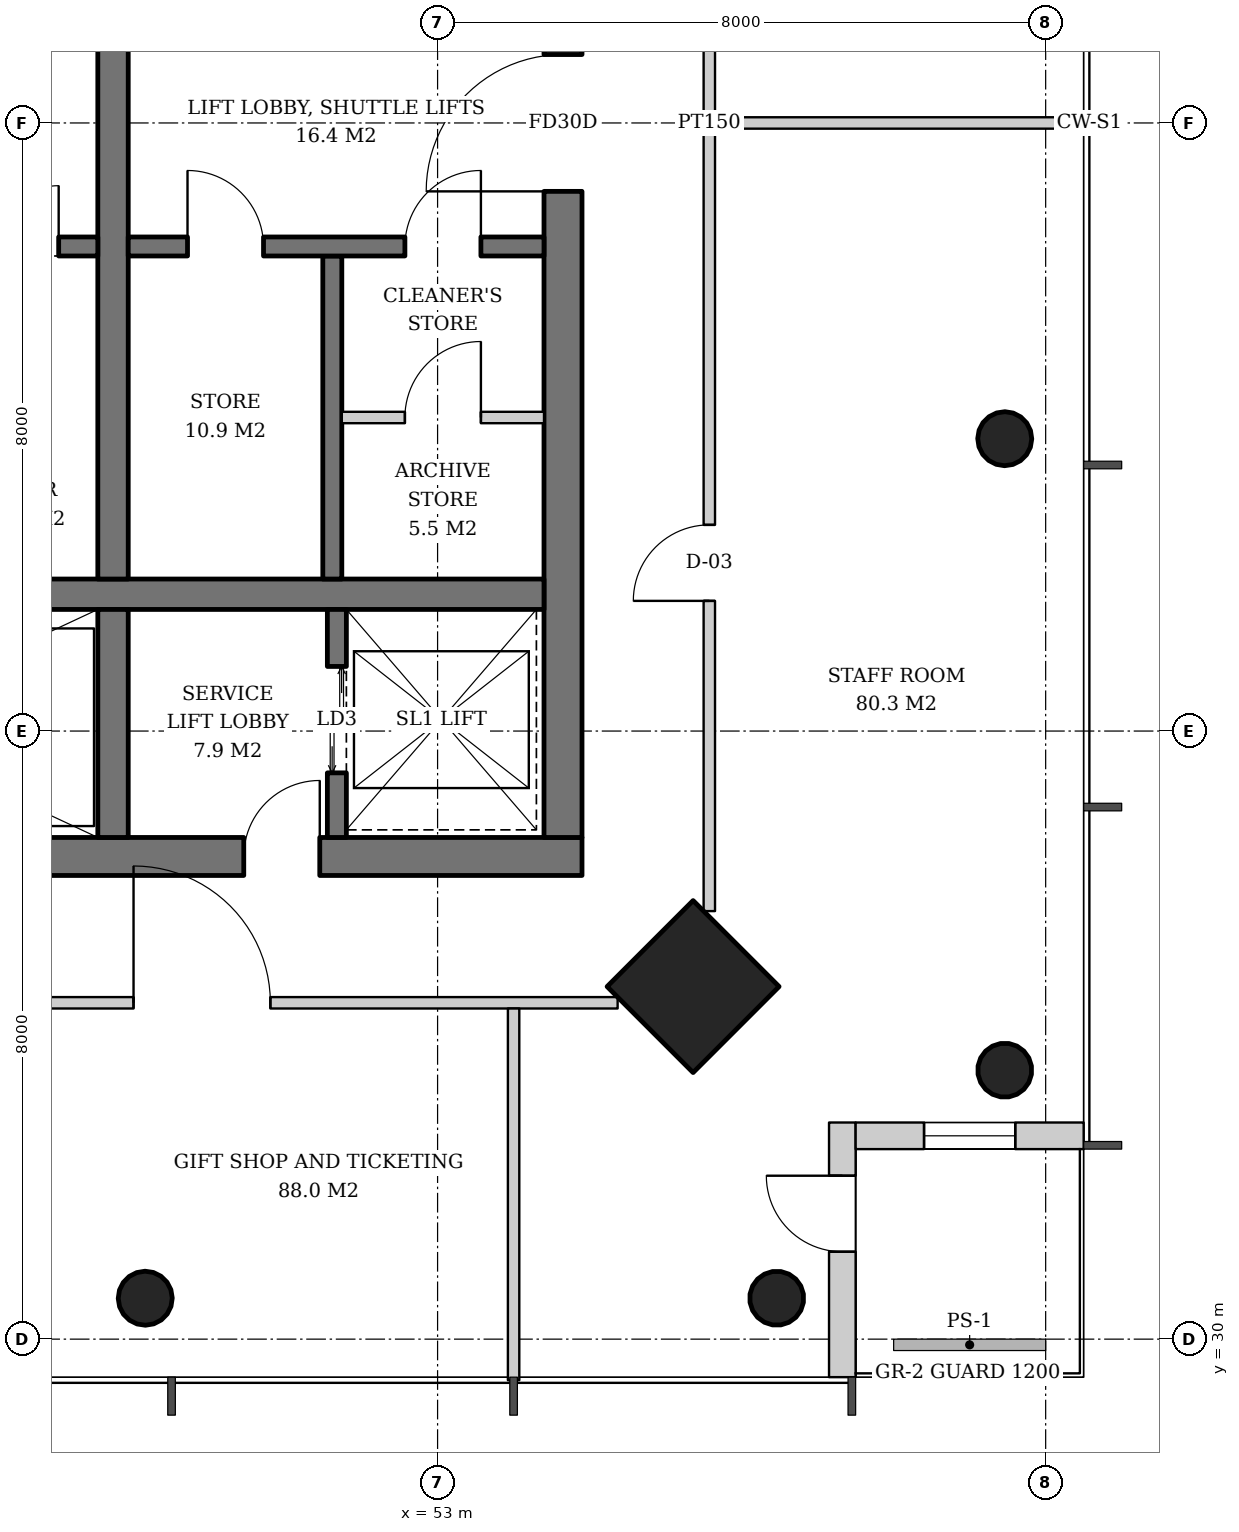
"""IFC4 building model, lengths in metres.
Left out: names, types, materials, properties, quantities, classifications, styles, units other than length and angle.
Written with IfcOpenShell. Run it as: python <this file> out.ifc"""

import sys

from ifc_helpers import new_model, si_unit, direction, frame, frame_2d, origin, origin_2d, place, context, subcontext, project, spatial, rectangle, hollow_circle, extrude, element, fill, save


model = new_model("IFC4")
c1 = context("Model", 3, precision=1e-05, world=origin(), true_north=direction((0.0, 1.0)))
c2 = subcontext(c1, "Body", "Model", "MODEL_VIEW")
j1 = project(units=[si_unit("LENGTHUNIT", "METRE"), si_unit("PLANEANGLEUNIT", "RADIAN")], contexts=[c1])
p1 = place(None, origin())
s1 = spatial("IfcSite", under=j1, at=p1, CompositionType="ELEMENT")
p2 = place(p1, origin())
s2 = spatial("IfcBuilding", under=s1, at=p2, CompositionType="ELEMENT")
p3 = place(p2, frame((0.0, 0.0, 287.0)))
s3 = spatial("IfcBuildingStorey", under=s2, at=p3, CompositionType="ELEMENT", Elevation=287.0)
p4 = place(p3, frame((60.5, 33.5, 0.0), z_axis=(-0.031898107953, 0.031898107953, 0.998981992539), x_axis=(-0.707106781187, -0.707106781187, 0.0)))
e1 = element("IfcColumn", 1, at=p4, inside=s3, PredefinedType="COLUMN", context=c2, shape_type="SweptSolid", body=[
    extrude(hollow_circle(Radius=0.355, WallThickness=0.025, at=origin_2d()), origin(), (0.0, 0.0, 1.0), 3.804),
])
p5 = place(p3, frame((60.5, 41.833, 0.0), z_axis=(-0.031912535354, 0.010658915229, 0.999433828532), x_axis=(-0.316800238982, -0.948492281772, 0.0)))
e2 = element("IfcColumn", 2, at=p5, inside=s3, PredefinedType="COLUMN", context=c2, shape_type="SweptSolid", body=[
    extrude(hollow_circle(Radius=0.355, WallThickness=0.025, at=origin_2d()), origin(), (0.0, 0.0, 1.0), 3.802),
])
p6 = place(p3, frame((56.4, 34.6, 0.0), z_axis=(-0.031898107953, 0.031898107953, 0.998981992539), x_axis=(-0.707106781187, -0.707106781187, 0.0)))
e3 = element("IfcColumn", 3, at=p6, inside=s3, PredefinedType="COLUMN", context=c2, shape_type="SweptSolid", body=[
    extrude(rectangle(XDim=1.6, YDim=1.6, at=origin_2d()), origin(), (0.0, 0.0, 1.0), 3.804),
])
p7 = place(p3, frame((57.5, 30.5, 0.0), z_axis=(-0.031898107953, 0.031898107953, 0.998981992539), x_axis=(-0.707106781187, -0.707106781187, 0.0)))
e4 = element("IfcColumn", 4, at=p7, inside=s3, PredefinedType="COLUMN", context=c2, shape_type="SweptSolid", body=[
    extrude(hollow_circle(Radius=0.355, WallThickness=0.025, at=origin_2d()), origin(), (0.0, 0.0, 1.0), 3.804),
])
p8 = place(p3, frame((49.167, 30.5, 0.0), z_axis=(-0.010658915229, 0.031912535354, 0.999433828532), x_axis=(-0.948492281772, -0.316800238982, 0.0)))
e5 = element("IfcColumn", 5, at=p8, inside=s3, PredefinedType="COLUMN", context=c2, shape_type="SweptSolid", body=[
    extrude(hollow_circle(Radius=0.355, WallThickness=0.025, at=origin_2d()), origin(), (0.0, 0.0, 1.0), 3.802),
])
p9 = place(p3, frame((35.1, 36.35, 0.0), z_axis=(0.0, 0.0, 1.0), x_axis=(1.0, 0.0, 0.0)))
e6 = element("IfcWall", 6, at=p9, inside=s3, PredefinedType="SHEAR", context=c2, shape_type="SweptSolid", body=[
    extrude(rectangle(XDim=19.8, YDim=0.5, at=frame_2d((9.9, 0.0))), origin(), (0.0, 0.0, 1.0), 3.8),
])
p10 = place(p9, frame((3.9, 0.0, 0.0)))
e7 = element("IfcOpeningElement", 7, at=p10, cuts=e6, PredefinedType="OPENING", context=c2, shape_type="SweptSolid", body=[
    extrude(rectangle(XDim=1.0, YDim=2.1, at=frame_2d((0.5, 1.05))), frame((0.0, 0.26, 0.0), z_axis=(0.0, -1.0, 0.0), x_axis=(1.0, 0.0, 0.0)), (0.0, 0.0, 1.0), 0.52),
])
p11 = place(p9, frame((15.35, 0.0, 0.0)))
e8 = element("IfcOpeningElement", 8, at=p11, cuts=e6, PredefinedType="OPENING", context=c2, shape_type="SweptSolid", body=[
    extrude(rectangle(XDim=1.0, YDim=2.1, at=frame_2d((0.5, 1.05))), frame((0.0, 0.26, 0.0), z_axis=(0.0, -1.0, 0.0), x_axis=(1.0, 0.0, 0.0)), (0.0, 0.0, 1.0), 0.52),
])
p12 = place(p3, frame((54.65, 36.6, 0.0), z_axis=(0.0, 0.0, 1.0), x_axis=(0.0, 1.0, 0.0)))
e9 = element("IfcWall", 9, at=p12, inside=s3, PredefinedType="SHEAR", context=c2, shape_type="SweptSolid", body=[
    extrude(rectangle(XDim=18.8, YDim=0.5, at=frame_2d((9.4, 0.0))), origin(), (0.0, 0.0, 1.0), 3.8),
])
p13 = place(p12, frame((8.5, 0.0, 0.0)))
e10 = element("IfcOpeningElement", 10, at=p13, cuts=e9, PredefinedType="OPENING", context=c2, shape_type="SweptSolid", body=[
    extrude(rectangle(XDim=1.8, YDim=2.4, at=frame_2d((0.9, 1.2))), frame((0.0, 0.26, 0.0), z_axis=(0.0, -1.0, 0.0), x_axis=(1.0, 0.0, 0.0)), (0.0, 0.0, 1.0), 0.52),
])
p14 = place(p3, frame((35.6, 39.8, 0.0), z_axis=(0.0, 0.0, 1.0), x_axis=(1.0, 0.0, 0.0)))
e11 = element("IfcWall", 11, at=p14, inside=s3, PredefinedType="SHEAR", context=c2, shape_type="SweptSolid", body=[
    extrude(rectangle(XDim=18.8, YDim=0.4, at=frame_2d((9.4, 0.0))), origin(), (0.0, 0.0, 1.0), 3.8),
])
p15 = place(p3, frame((48.73, 36.6, 0.0), z_axis=(0.0, 0.0, 1.0), x_axis=(0.0, 1.0, 0.0)))
e12 = element("IfcWall", 12, at=p15, inside=s3, PredefinedType="SHEAR", context=c2, shape_type="SweptSolid", body=[
    extrude(rectangle(XDim=3.0, YDim=0.4, at=frame_2d((1.5, 0.0))), origin(), (0.0, 0.0, 1.0), 3.8),
])
p16 = place(p3, frame((48.73, 40.0, 0.0), z_axis=(0.0, 0.0, 1.0), x_axis=(0.0, 1.0, 0.0)))
e13 = element("IfcWall", 13, at=p16, inside=s3, PredefinedType="SHEAR", context=c2, shape_type="SweptSolid", body=[
    extrude(rectangle(XDim=12.0, YDim=0.4, at=frame_2d((6.0, 0.0))), origin(), (0.0, 0.0, 1.0), 3.8),
])
p17 = place(p3, frame((58.325, 29.5, 0.0), z_axis=(0.0, 0.0, 1.0), x_axis=(0.0, 1.0, 0.0)))
e14 = element("IfcWall", 14, at=p17, inside=s3, PredefinedType="SOLIDWALL", context=c2, shape_type="SweptSolid", body=[
    extrude(rectangle(XDim=3.35, YDim=0.35, at=frame_2d((1.675, 0.0))), origin(), (0.0, 0.0, 1.0), 3.55),
])
p18 = place(p17, frame((1.65, 0.0, 0.0)))
e15 = element("IfcOpeningElement", 15, at=p18, cuts=e14, PredefinedType="OPENING", context=c2, shape_type="SweptSolid", body=[
    extrude(rectangle(XDim=1.0, YDim=2.4, at=frame_2d((0.5, 1.2))), frame((0.0, 0.185, 0.0), z_axis=(0.0, -1.0, 0.0), x_axis=(1.0, 0.0, 0.0)), (0.0, 0.0, 1.0), 0.37),
])
p19 = place(p3, frame((58.5, 32.675, 0.0), z_axis=(0.0, 0.0, 1.0), x_axis=(1.0, 0.0, 0.0)))
e16 = element("IfcWall", 16, at=p19, inside=s3, PredefinedType="SOLIDWALL", context=c2, shape_type="SweptSolid", body=[
    extrude(rectangle(XDim=3.0, YDim=0.35, at=frame_2d((1.5, 0.0))), origin(), (0.0, 0.0, 1.0), 3.55),
])
p20 = place(p19, frame((0.9, 0.0, 0.6)))
e17 = element("IfcOpeningElement", 17, at=p20, cuts=e16, PredefinedType="OPENING", context=c2, shape_type="SweptSolid", body=[
    extrude(rectangle(XDim=1.2, YDim=2.55, at=frame_2d((0.6, 1.275))), frame((0.0, 0.185, 0.0), z_axis=(0.0, -1.0, 0.0), x_axis=(1.0, 0.0, 0.0)), (0.0, 0.0, 1.0), 0.37),
])
p21 = place(p3, frame((51.675, 36.6, 0.0), z_axis=(0.0, 0.0, 1.0), x_axis=(0.0, 1.0, 0.0)))
e18 = element("IfcWall", 18, at=p21, inside=s3, PredefinedType="SHEAR", context=c2, shape_type="SweptSolid", body=[
    extrude(rectangle(XDim=3.0, YDim=0.25, at=frame_2d((1.5, 0.0))), origin(), (0.0, 0.0, 1.0), 3.8),
])
p22 = place(p21, frame((0.85, 0.0, 0.0)))
e19 = element("IfcOpeningElement", 19, at=p22, cuts=e18, PredefinedType="OPENING", context=c2, shape_type="SweptSolid", body=[
    extrude(rectangle(XDim=1.4, YDim=2.4, at=frame_2d((0.7, 1.2))), frame((0.0, 0.135, 0.0), z_axis=(0.0, -1.0, 0.0), x_axis=(1.0, 0.0, 0.0)), (0.0, 0.0, 1.0), 0.27),
])
p23 = place(p3, frame((35.6, 44.375, 0.0), z_axis=(0.0, 0.0, 1.0), x_axis=(1.0, 0.0, 0.0)))
e20 = element("IfcWall", 20, at=p23, inside=s3, PredefinedType="SHEAR", context=c2, shape_type="SweptSolid", body=[
    extrude(rectangle(XDim=12.93, YDim=0.25, at=frame_2d((6.465, 0.0))), origin(), (0.0, 0.0, 1.0), 3.8),
])
p24 = place(p23, frame((0.75, 0.0, 0.0)))
e21 = element("IfcOpeningElement", 21, at=p24, cuts=e20, PredefinedType="OPENING", context=c2, shape_type="SweptSolid", body=[
    extrude(rectangle(XDim=1.1, YDim=2.2, at=frame_2d((0.55, 1.1))), frame((0.0, 0.135, 0.0), z_axis=(0.0, -1.0, 0.0), x_axis=(1.0, 0.0, 0.0)), (0.0, 0.0, 1.0), 0.27),
])
p25 = place(p23, frame((3.55, 0.0, 0.0)))
e22 = element("IfcOpeningElement", 22, at=p25, cuts=e20, PredefinedType="OPENING", context=c2, shape_type="SweptSolid", body=[
    extrude(rectangle(XDim=1.1, YDim=2.2, at=frame_2d((0.55, 1.1))), frame((0.0, 0.135, 0.0), z_axis=(0.0, -1.0, 0.0), x_axis=(1.0, 0.0, 0.0)), (0.0, 0.0, 1.0), 0.27),
])
p26 = place(p23, frame((6.3, 0.0, 0.0)))
e23 = element("IfcOpeningElement", 23, at=p26, cuts=e20, PredefinedType="OPENING", context=c2, shape_type="SweptSolid", body=[
    extrude(rectangle(XDim=1.1, YDim=2.2, at=frame_2d((0.55, 1.1))), frame((0.0, 0.135, 0.0), z_axis=(0.0, -1.0, 0.0), x_axis=(1.0, 0.0, 0.0)), (0.0, 0.0, 1.0), 0.27),
])
p27 = place(p23, frame((9.1, 0.0, 0.0)))
e24 = element("IfcOpeningElement", 24, at=p27, cuts=e20, PredefinedType="OPENING", context=c2, shape_type="SweptSolid", body=[
    extrude(rectangle(XDim=1.0, YDim=2.1, at=frame_2d((0.5, 1.05))), frame((0.0, 0.135, 0.0), z_axis=(0.0, -1.0, 0.0), x_axis=(1.0, 0.0, 0.0)), (0.0, 0.0, 1.0), 0.27),
])
p28 = place(p23, frame((11.615, 0.0, 0.0)))
e25 = element("IfcOpeningElement", 25, at=p28, cuts=e20, PredefinedType="OPENING", context=c2, shape_type="SweptSolid", body=[
    extrude(rectangle(XDim=0.8, YDim=2.0, at=frame_2d((0.4, 1.0))), frame((0.0, 0.135, 0.0), z_axis=(0.0, -1.0, 0.0), x_axis=(1.0, 0.0, 0.0)), (0.0, 0.0, 1.0), 0.27),
])
p29 = place(p3, frame((51.615, 44.25, 0.0), z_axis=(0.0, 0.0, 1.0), x_axis=(0.0, -1.0, 0.0)))
e26 = element("IfcWall", 26, at=p29, inside=s3, PredefinedType="SHEAR", context=c2, shape_type="SweptSolid", body=[
    extrude(rectangle(XDim=4.25, YDim=0.25, at=frame_2d((2.125, 0.0))), origin(), (0.0, 0.0, 1.0), 3.8),
])
p30 = place(p3, frame((48.93, 44.375, 0.0), z_axis=(0.0, 0.0, 1.0), x_axis=(1.0, 0.0, 0.0)))
e27 = element("IfcWall", 27, at=p30, inside=s3, PredefinedType="SHEAR", context=c2, shape_type="SweptSolid", body=[
    extrude(rectangle(XDim=5.47, YDim=0.25, at=frame_2d((2.735, 0.0))), origin(), (0.0, 0.0, 1.0), 3.8),
])
p31 = place(p30, frame((0.78, 0.0, 0.0)))
e28 = element("IfcOpeningElement", 28, at=p31, cuts=e27, PredefinedType="OPENING", context=c2, shape_type="SweptSolid", body=[
    extrude(rectangle(XDim=1.0, YDim=2.1, at=frame_2d((0.5, 1.05))), frame((0.0, 0.135, 0.0), z_axis=(0.0, -1.0, 0.0), x_axis=(1.0, 0.0, 0.0)), (0.0, 0.0, 1.0), 0.27),
])
p32 = place(p30, frame((3.64, 0.0, 0.0)))
e29 = element("IfcOpeningElement", 29, at=p32, cuts=e27, PredefinedType="OPENING", context=c2, shape_type="SweptSolid", body=[
    extrude(rectangle(XDim=1.0, YDim=2.1, at=frame_2d((0.5, 1.05))), frame((0.0, 0.135, 0.0), z_axis=(0.0, -1.0, 0.0), x_axis=(1.0, 0.0, 0.0)), (0.0, 0.0, 1.0), 0.27),
])
p33 = place(p3, frame((51.74, 42.125, 0.0), z_axis=(0.0, 0.0, 1.0), x_axis=(1.0, 0.0, 0.0)))
e30 = element("IfcWall", 30, at=p33, inside=s3, PredefinedType="SOLIDWALL", context=c2, shape_type="SweptSolid", body=[
    extrude(rectangle(XDim=2.66, YDim=0.15, at=frame_2d((1.33, 0.0))), origin(), (0.0, 0.0, 1.0), 3.55),
])
p34 = place(p33, frame((0.83, 0.0, 0.0)))
e31 = element("IfcOpeningElement", 31, at=p34, cuts=e30, PredefinedType="OPENING", context=c2, shape_type="SweptSolid", body=[
    extrude(rectangle(XDim=1.0, YDim=2.1, at=frame_2d((0.5, 1.05))), frame((0.0, 0.085, 0.0), z_axis=(0.0, -1.0, 0.0), x_axis=(1.0, 0.0, 0.0)), (0.0, 0.0, 1.0), 0.17),
])
p35 = place(p3, frame((56.65, 46.0, 0.0), z_axis=(0.0, 0.0, 1.0), x_axis=(1.0, 0.0, 0.0)))
e32 = element("IfcWall", 32, at=p35, inside=s3, PredefinedType="PARTITIONING", context=c2, shape_type="SweptSolid", body=[
    extrude(rectangle(XDim=4.89, YDim=0.15, at=frame_2d((2.445, 0.0))), origin(), (0.0, 0.0, 1.0), 3.05),
])
p36 = place(p3, frame((56.575, 35.631, 0.0), z_axis=(0.0, 0.0, 1.0), x_axis=(0.0, 1.0, 0.0)))
e33 = element("IfcWall", 33, at=p36, inside=s3, PredefinedType="PARTITIONING", context=c2, shape_type="SweptSolid", body=[
    extrude(rectangle(XDim=20.737, YDim=0.15, at=frame_2d((10.369, 0.0))), origin(), (0.0, 0.0, 1.0), 2.95),
])
p37 = place(p36, frame((4.081, 0.0, 0.0)))
e34 = element("IfcOpeningElement", 34, at=p37, cuts=e33, PredefinedType="OPENING", context=c2, shape_type="SweptSolid", body=[
    extrude(rectangle(XDim=1.0, YDim=2.1, at=frame_2d((0.5, 1.05))), frame((0.0, 0.085, 0.0), z_axis=(0.0, -1.0, 0.0), x_axis=(1.0, 0.0, 0.0)), (0.0, 0.0, 1.0), 0.17),
])
p38 = place(p36, frame((14.369, 0.0, 0.0)))
e35 = element("IfcOpeningElement", 35, at=p38, cuts=e33, PredefinedType="OPENING", context=c2, shape_type="SweptSolid", body=[
    extrude(rectangle(XDim=1.0, YDim=2.1, at=frame_2d((0.5, 1.05))), frame((0.0, 0.085, 0.0), z_axis=(0.0, -1.0, 0.0), x_axis=(1.0, 0.0, 0.0)), (0.0, 0.0, 1.0), 0.17),
])
p39 = place(p3, frame((34.631, 34.425, 0.0), z_axis=(0.0, 0.0, 1.0), x_axis=(1.0, 0.0, 0.0)))
e36 = element("IfcWall", 36, at=p39, inside=s3, PredefinedType="PARTITIONING", context=c2, shape_type="SweptSolid", body=[
    extrude(rectangle(XDim=20.737, YDim=0.15, at=frame_2d((10.369, 0.0))), origin(), (0.0, 0.0, 1.0), 2.95),
])
p40 = place(p39, frame((1.169, 0.0, 0.0)))
e37 = element("IfcOpeningElement", 37, at=p40, cuts=e36, PredefinedType="OPENING", context=c2, shape_type="SweptSolid", body=[
    extrude(rectangle(XDim=0.8, YDim=2.1, at=frame_2d((0.4, 1.05))), frame((0.0, 0.085, 0.0), z_axis=(0.0, -1.0, 0.0), x_axis=(1.0, 0.0, 0.0)), (0.0, 0.0, 1.0), 0.17),
])
p41 = place(p39, frame((4.669, 0.0, 0.0)))
e38 = element("IfcOpeningElement", 38, at=p41, cuts=e36, PredefinedType="OPENING", context=c2, shape_type="SweptSolid", body=[
    extrude(rectangle(XDim=1.0, YDim=2.1, at=frame_2d((0.5, 1.05))), frame((0.0, 0.085, 0.0), z_axis=(0.0, -1.0, 0.0), x_axis=(1.0, 0.0, 0.0)), (0.0, 0.0, 1.0), 0.17),
])
p42 = place(p39, frame((8.369, 0.0, 0.0)))
e39 = element("IfcOpeningElement", 39, at=p42, cuts=e36, PredefinedType="OPENING", context=c2, shape_type="SweptSolid", body=[
    extrude(rectangle(XDim=0.8, YDim=2.1, at=frame_2d((0.4, 1.05))), frame((0.0, 0.085, 0.0), z_axis=(0.0, -1.0, 0.0), x_axis=(1.0, 0.0, 0.0)), (0.0, 0.0, 1.0), 0.17),
])
p43 = place(p39, frame((14.369, 0.0, 0.0)))
e40 = element("IfcOpeningElement", 40, at=p43, cuts=e36, PredefinedType="OPENING", context=c2, shape_type="SweptSolid", body=[
    extrude(rectangle(XDim=1.8, YDim=2.4, at=frame_2d((0.9, 1.2))), frame((0.0, 0.085, 0.0), z_axis=(0.0, -1.0, 0.0), x_axis=(1.0, 0.0, 0.0)), (0.0, 0.0, 1.0), 0.17),
])
p44 = place(p3, frame((54.0, 34.35, 0.0), z_axis=(0.0, 0.0, 1.0), x_axis=(0.0, -1.0, 0.0)))
e41 = element("IfcWall", 41, at=p44, inside=s3, PredefinedType="PARTITIONING", context=c2, shape_type="SweptSolid", body=[
    extrude(rectangle(XDim=4.89, YDim=0.15, at=frame_2d((2.445, 0.0))), origin(), (0.0, 0.0, 1.0), 3.05),
])
p45 = place(p18, origin())
e42 = element("IfcDoor", 42, at=p45, inside=s3, OperationType="SINGLE_SWING_RIGHT", PredefinedType="DOOR", context=c2, shape_type="SweptSolid", body=[
    extrude(rectangle(XDim=1.0, YDim=2.4, at=frame_2d((0.5, 1.2))), frame((0.0, 0.025, 0.0), z_axis=(0.0, -1.0, 0.0), x_axis=(1.0, 0.0, 0.0)), (0.0, 0.0, 1.0), 0.05),
])
fill(e15, e42)
p46 = place(p20, origin())
e43 = element("IfcWindow", 43, at=p46, inside=s3, PartitioningType="SINGLE_PANEL", PredefinedType="WINDOW", context=c2, shape_type="SweptSolid", body=[
    extrude(rectangle(XDim=1.2, YDim=2.55, at=frame_2d((0.6, 1.275))), frame((0.0, 0.03, 0.0), z_axis=(0.0, -1.0, 0.0), x_axis=(1.0, 0.0, 0.0)), (0.0, 0.0, 1.0), 0.06),
])
fill(e17, e43)
p47 = place(p22, origin())
e44 = element("IfcDoor", 44, at=p47, inside=s3, OperationType="DOUBLE_DOOR_SLIDING", PredefinedType="DOOR", context=c2, shape_type="SweptSolid", body=[
    extrude(rectangle(XDim=1.4, YDim=2.4, at=frame_2d((0.7, 1.2))), frame((0.0, 0.025, 0.0), z_axis=(0.0, -1.0, 0.0), x_axis=(1.0, 0.0, 0.0)), (0.0, 0.0, 1.0), 0.05),
])
fill(e19, e44)
p48 = place(p28, origin())
e45 = element("IfcDoor", 45, at=p48, inside=s3, OperationType="SINGLE_SWING_RIGHT", PredefinedType="DOOR", context=c2, shape_type="SweptSolid", body=[
    extrude(rectangle(XDim=0.8, YDim=2.0, at=frame_2d((0.4, 1.0))), frame((0.0, 0.025, 0.0), z_axis=(0.0, -1.0, 0.0), x_axis=(1.0, 0.0, 0.0)), (0.0, 0.0, 1.0), 0.05),
])
fill(e25, e45)
p49 = place(p31, origin())
e46 = element("IfcDoor", 46, at=p49, inside=s3, OperationType="SINGLE_SWING_LEFT", PredefinedType="DOOR", context=c2, shape_type="SweptSolid", body=[
    extrude(rectangle(XDim=1.0, YDim=2.1, at=frame_2d((0.5, 1.05))), frame((0.0, 0.025, 0.0), z_axis=(0.0, -1.0, 0.0), x_axis=(1.0, 0.0, 0.0)), (0.0, 0.0, 1.0), 0.05),
])
fill(e28, e46)
p50 = place(p32, origin())
e47 = element("IfcDoor", 47, at=p50, inside=s3, OperationType="SINGLE_SWING_RIGHT", PredefinedType="DOOR", context=c2, shape_type="SweptSolid", body=[
    extrude(rectangle(XDim=1.0, YDim=2.1, at=frame_2d((0.5, 1.05))), frame((0.0, 0.025, 0.0), z_axis=(0.0, -1.0, 0.0), x_axis=(1.0, 0.0, 0.0)), (0.0, 0.0, 1.0), 0.05),
])
fill(e29, e47)
p51 = place(p34, origin())
e48 = element("IfcDoor", 48, at=p51, inside=s3, OperationType="SINGLE_SWING_RIGHT", PredefinedType="DOOR", context=c2, shape_type="SweptSolid", body=[
    extrude(rectangle(XDim=1.0, YDim=2.1, at=frame_2d((0.5, 1.05))), frame((0.0, 0.025, 0.0), z_axis=(0.0, -1.0, 0.0), x_axis=(1.0, 0.0, 0.0)), (0.0, 0.0, 1.0), 0.05),
])
fill(e31, e48)
p52 = place(p13, origin())
e49 = element("IfcDoor", 49, at=p52, inside=s3, OperationType="DOUBLE_DOOR_SINGLE_SWING", PredefinedType="DOOR", context=c2, shape_type="SweptSolid", body=[
    extrude(rectangle(XDim=1.8, YDim=2.4, at=frame_2d((0.9, 1.2))), frame((0.0, 0.025, 0.0), z_axis=(0.0, -1.0, 0.0), x_axis=(1.0, 0.0, 0.0)), (0.0, 0.0, 1.0), 0.05),
])
fill(e10, e49)
p53 = place(p11, origin())
e50 = element("IfcDoor", 50, at=p53, inside=s3, OperationType="SINGLE_SWING_RIGHT", PredefinedType="DOOR", context=c2, shape_type="SweptSolid", body=[
    extrude(rectangle(XDim=1.0, YDim=2.1, at=frame_2d((0.5, 1.05))), frame((0.0, 0.025, 0.0), z_axis=(0.0, -1.0, 0.0), x_axis=(1.0, 0.0, 0.0)), (0.0, 0.0, 1.0), 0.05),
])
fill(e8, e50)
p54 = place(p37, origin())
e51 = element("IfcDoor", 51, at=p54, inside=s3, OperationType="SINGLE_SWING_LEFT", PredefinedType="DOOR", context=c2, shape_type="SweptSolid", body=[
    extrude(rectangle(XDim=1.0, YDim=2.1, at=frame_2d((0.5, 1.05))), frame((0.0, 0.025, 0.0), z_axis=(0.0, -1.0, 0.0), x_axis=(1.0, 0.0, 0.0)), (0.0, 0.0, 1.0), 0.05),
])
fill(e34, e51)
p55 = place(p43, origin())
e52 = element("IfcDoor", 52, at=p55, inside=s3, OperationType="DOUBLE_DOOR_SINGLE_SWING", PredefinedType="DOOR", context=c2, shape_type="SweptSolid", body=[
    extrude(rectangle(XDim=1.8, YDim=2.4, at=frame_2d((0.9, 1.2))), frame((0.0, 0.025, 0.0), z_axis=(0.0, -1.0, 0.0), x_axis=(1.0, 0.0, 0.0)), (0.0, 0.0, 1.0), 0.05),
])
fill(e40, e52)
save(model, sys.argv[1])
